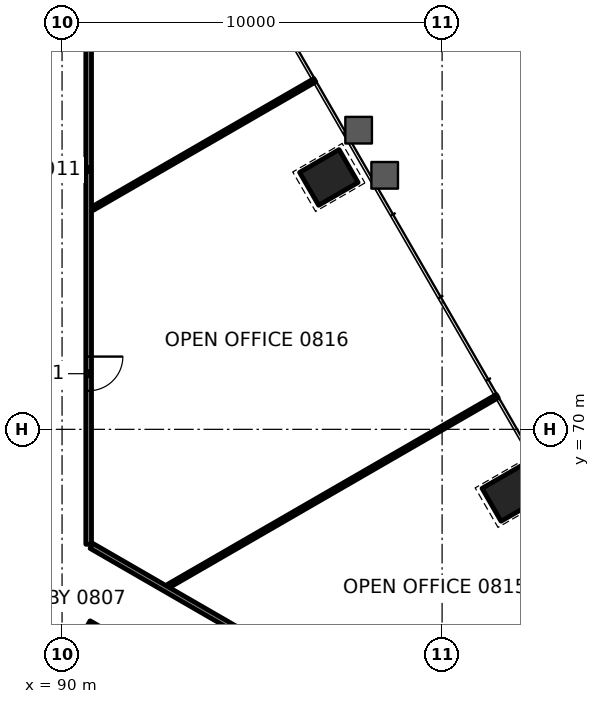
"""IFC4 building model, lengths in metres.
Left out: names, types, materials, properties, quantities, classifications, styles, units other than length and angle.
Written with IfcOpenShell. Run it as: python <this file> out.ifc"""

import sys

from ifc_helpers import new_model, si_unit, direction, frame, frame_2d, origin, origin_2d, place, context, subcontext, project, spatial, rectangle, extrude, element, fill, save


model = new_model("IFC4")
c1 = context("Model", 3, precision=1e-05, world=origin(), true_north=direction((0.0, 1.0)))
c2 = subcontext(c1, "Body", "Model", "MODEL_VIEW")
j1 = project(units=[si_unit("LENGTHUNIT", "METRE"), si_unit("PLANEANGLEUNIT", "RADIAN")], contexts=[c1])
p1 = place(None, origin())
s1 = spatial("IfcSite", under=j1, at=p1, CompositionType="ELEMENT")
p2 = place(p1, origin())
s2 = spatial("IfcBuilding", under=s1, at=p2, CompositionType="ELEMENT")
p3 = place(p2, frame((0.0, 0.0, 40.0)))
s3 = spatial("IfcBuildingStorey", under=s2, at=p3, CompositionType="ELEMENT", Elevation=40.0)
for number, where, z_axis, x_axis in (
    (1, (101.821, 68.315, -0.0), (0.0, 0.0, 1.0), (-0.5, 0.866, 0.0)),
    (2, (97.021, 76.628, -0.0), (0.0, 0.0, 1.0), (-0.5, 0.866, 0.0)),
):
    element("IfcColumn", number, at=place(p3, frame(where, z_axis=z_axis, x_axis=x_axis)), inside=s3, PredefinedType="COLUMN", context=c2, shape_type="SweptSolid", body=[
        extrude(rectangle(XDim=1.0, YDim=1.2, at=origin_2d()), origin(), (0.0, 0.0, 1.0), 4.2),
    ])
p4 = place(p3, frame((92.801, 65.878, 0.0), z_axis=(0.0, 0.0, 1.0), x_axis=(0.86602359872, 0.50000312645, 0.0)))
e3 = element("IfcWall", 3, at=p4, inside=s3, PredefinedType="PARTITIONING", context=c2, shape_type="SweptSolid", body=[
    extrude(rectangle(XDim=9.989, YDim=0.1, at=frame_2d((4.995, 0.0))), origin(), (0.0, 0.0, 1.0), 3.165),
])
p5 = place(p3, frame((90.801, 75.809, 0.0), z_axis=(0.0, 0.0, 1.0), x_axis=(0.866012872937, 0.500021703436, 0.0)))
e4 = element("IfcWall", 4, at=p5, inside=s3, PredefinedType="PARTITIONING", context=c2, shape_type="SweptSolid", body=[
    extrude(rectangle(XDim=6.756, YDim=0.1, at=frame_2d((3.378, 0.0))), origin(), (0.0, 0.0, 1.0), 3.165),
])
p6 = place(p3, frame((90.7, 86.699, 0.0), z_axis=(0.0, 0.0, 1.0), x_axis=(0.0, -1.0, 0.0)))
e5 = element("IfcWall", 5, at=p6, inside=s3, PredefinedType="PARTITIONING", context=c2, shape_type="SweptSolid", body=[
    extrude(rectangle(XDim=19.725, YDim=0.15, at=frame_2d((9.862, 0.0))), origin(), (0.0, 0.0, 1.0), 3.4),
])
p7 = place(p6, frame((14.785, 0.0, 0.0)))
e6 = element("IfcOpeningElement", 6, at=p7, cuts=e5, PredefinedType="OPENING", context=c2, shape_type="SweptSolid", body=[
    extrude(rectangle(XDim=0.9, YDim=2.1, at=frame_2d((0.45, 1.05))), frame((0.0, 0.085, 0.0), z_axis=(0.0, -1.0, 0.0), x_axis=(1.0, 0.0, 0.0)), (0.0, 0.0, 1.0), 0.17),
])
p8 = place(p3, frame((90.775, 66.932, 0.0), z_axis=(0.0, 0.0, 1.0), x_axis=(0.86602195393, -0.500005975275, 0.0)))
e7 = element("IfcWall", 7, at=p8, inside=s3, PredefinedType="PARTITIONING", context=c2, shape_type="SweptSolid", body=[
    extrude(rectangle(XDim=14.137, YDim=0.15, at=frame_2d((7.069, 0.0))), origin(), (0.0, 0.0, 1.0), 3.4),
])
p9 = place(p8, frame((7.629, 0.0, 0.0)))
e8 = element("IfcOpeningElement", 8, at=p9, cuts=e7, PredefinedType="OPENING", context=c2, shape_type="SweptSolid", body=[
    extrude(rectangle(XDim=0.9, YDim=2.1, at=frame_2d((0.45, 1.05))), frame((0.0, 0.085, 0.0), z_axis=(0.0, -1.0, 0.0), x_axis=(1.0, 0.0, 0.0)), (0.0, 0.0, 1.0), 0.17),
])
p10 = place(p3, frame((102.118, 58.304, 0.0), z_axis=(0.0, 0.0, 1.0), x_axis=(-0.866022774611, 0.500004553834, 0.0)))
e9 = element("IfcWall", 9, at=p10, inside=s3, PredefinedType="PARTITIONING", context=c2, shape_type="SweptSolid", body=[
    extrude(rectangle(XDim=13.185, YDim=0.15, at=frame_2d((6.593, 0.0))), origin(), (0.0, 0.0, 1.0), 3.247),
])
p11 = place(p10, frame((4.173, 0.0, 0.0)))
e10 = element("IfcOpeningElement", 10, at=p11, cuts=e9, PredefinedType="OPENING", context=c2, shape_type="SweptSolid", body=[
    extrude(rectangle(XDim=1.0, YDim=2.1, at=frame_2d((0.5, 1.05))), frame((0.0, 0.085, 0.0), z_axis=(0.0, -1.0, 0.0), x_axis=(1.0, 0.0, 0.0)), (0.0, 0.0, 1.0), 0.17),
])
p12 = place(p7, origin())
e11 = element("IfcDoor", 11, at=p12, inside=s3, OperationType="SINGLE_SWING_RIGHT", PredefinedType="DOOR", context=c2, shape_type="SweptSolid", body=[
    extrude(rectangle(XDim=0.9, YDim=2.1, at=frame_2d((0.45, 1.05))), frame((0.0, 0.025, 0.0), z_axis=(0.0, -1.0, 0.0), x_axis=(1.0, 0.0, 0.0)), (0.0, 0.0, 1.0), 0.05),
])
fill(e6, e11)
save(model, sys.argv[1])
